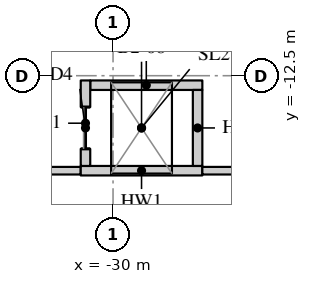
"""IFC4 building model, lengths in metres.
Left out: names, types, materials, properties, quantities, classifications, styles, units other than length and angle.
Written with IfcOpenShell. Run it as: python <this file> out.ifc"""

import sys

from ifc_helpers import new_model, si_unit, direction, frame, frame_2d, origin, place, context, subcontext, project, spatial, rectangle, extrude, element, fill, save


model = new_model("IFC4")
c1 = context("Model", 3, precision=1e-05, world=origin(), true_north=direction((0.0, 1.0)))
c2 = subcontext(c1, "Body", "Model", "MODEL_VIEW")
j1 = project(units=[si_unit("LENGTHUNIT", "METRE"), si_unit("PLANEANGLEUNIT", "RADIAN")], contexts=[c1])
p1 = place(None, origin())
s1 = spatial("IfcSite", under=j1, at=p1, CompositionType="ELEMENT")
p2 = place(p1, origin())
s2 = spatial("IfcBuilding", under=s1, at=p2, CompositionType="ELEMENT")
p3 = place(p2, frame((0.0, 0.0, -10.4)))
s3 = spatial("IfcBuildingStorey", under=s2, at=p3, CompositionType="ELEMENT", Elevation=-10.4)
p4 = place(p3, frame((-37.915, -15.0, 0.0), z_axis=(0.0, 0.0, 1.0), x_axis=(1.0, 0.0, 0.0)))
e1 = element("IfcWall", 1, at=p4, inside=s3, PredefinedType="PARTITIONING", context=c2, shape_type="SweptSolid", body=[
    extrude(rectangle(XDim=7.065, YDim=0.2, at=frame_2d((3.532, 0.0))), origin(), (0.0, 0.0, 1.0), 4.75),
])
p5 = place(p4, frame((2.015, 0.0, 0.0)))
e2 = element("IfcOpeningElement", 2, at=p5, cuts=e1, PredefinedType="OPENING", context=c2, shape_type="SweptSolid", body=[
    extrude(rectangle(XDim=1.8, YDim=2.1, at=frame_2d((0.9, 1.05))), frame((0.0, 0.11, 0.0), z_axis=(0.0, -1.0, 0.0), x_axis=(1.0, 0.0, 0.0)), (0.0, 0.0, 1.0), 0.22),
])
p6 = place(p3, frame((-30.85, -15.0, 0.0), z_axis=(0.0, 0.0, 1.0), x_axis=(1.0, 0.0, 0.0)))
e3 = element("IfcWall", 3, at=p6, inside=s3, PredefinedType="SHEAR", context=c2, shape_type="SweptSolid", body=[
    extrude(rectangle(XDim=3.2, YDim=0.25, at=frame_2d((1.6, 0.0))), origin(), (0.0, 0.0, 1.0), 4.75),
])
p7 = place(p3, frame((-27.65, -15.0, 0.0), z_axis=(0.0, 0.0, 1.0), x_axis=(1.0, 0.0, 0.0)))
e4 = element("IfcWall", 4, at=p7, inside=s3, PredefinedType="PARTITIONING", context=c2, shape_type="SweptSolid", body=[
    extrude(rectangle(XDim=6.107, YDim=0.2, at=frame_2d((3.053, 0.0))), origin(), (0.0, 0.0, 1.0), 4.75),
])
p8 = place(p7, frame((3.05, 0.0, 0.0)))
e5 = element("IfcOpeningElement", 5, at=p8, cuts=e4, PredefinedType="OPENING", context=c2, shape_type="SweptSolid", body=[
    extrude(rectangle(XDim=1.2, YDim=2.1, at=frame_2d((0.6, 1.05))), frame((0.0, 0.11, 0.0), z_axis=(0.0, -1.0, 0.0), x_axis=(1.0, 0.0, 0.0)), (0.0, 0.0, 1.0), 0.22),
])
p9 = place(p3, frame((-30.6, -12.75, 0.0), z_axis=(0.0, 0.0, 1.0), x_axis=(1.0, 0.0, 0.0)))
e6 = element("IfcWall", 6, at=p9, inside=s3, PredefinedType="SHEAR", context=c2, shape_type="SweptSolid", body=[
    extrude(rectangle(XDim=2.95, YDim=0.25, at=frame_2d((1.475, 0.0))), origin(), (0.0, 0.0, 1.0), 4.75),
])
p10 = place(p3, frame((-30.725, -14.875, 0.0), z_axis=(0.0, 0.0, 1.0), x_axis=(0.0, 1.0, 0.0)))
e7 = element("IfcWall", 7, at=p10, inside=s3, PredefinedType="SHEAR", context=c2, shape_type="SweptSolid", body=[
    extrude(rectangle(XDim=2.25, YDim=0.25, at=frame_2d((1.125, 0.0))), origin(), (0.0, 0.0, 1.0), 4.75),
])
p11 = place(p10, frame((0.45, 0.0, 0.0)))
e8 = element("IfcOpeningElement", 8, at=p11, cuts=e7, PredefinedType="OPENING", context=c2, shape_type="SweptSolid", body=[
    extrude(rectangle(XDim=1.1, YDim=2.1, at=frame_2d((0.55, 1.05))), frame((0.0, 0.135, 0.0), z_axis=(0.0, -1.0, 0.0), x_axis=(1.0, 0.0, 0.0)), (0.0, 0.0, 1.0), 0.27),
])
p12 = place(p3, frame((-27.775, -14.875, 0.0), z_axis=(0.0, 0.0, 1.0), x_axis=(0.0, 1.0, 0.0)))
e9 = element("IfcWall", 9, at=p12, inside=s3, PredefinedType="SHEAR", context=c2, shape_type="SweptSolid", body=[
    extrude(rectangle(XDim=2.0, YDim=0.25, at=frame_2d((1.0, 0.0))), origin(), (0.0, 0.0, 1.0), 4.75),
])
p13 = place(p11, origin())
e10 = element("IfcDoor", 10, at=p13, inside=s3, OperationType="SLIDING_TO_LEFT", PredefinedType="DOOR", context=c2, shape_type="SweptSolid", body=[
    extrude(rectangle(XDim=1.1, YDim=2.1, at=frame_2d((0.55, 1.05))), frame((0.0, 0.025, 0.0), z_axis=(0.0, -1.0, 0.0), x_axis=(1.0, 0.0, 0.0)), (0.0, 0.0, 1.0), 0.05),
])
fill(e8, e10)
save(model, sys.argv[1])
